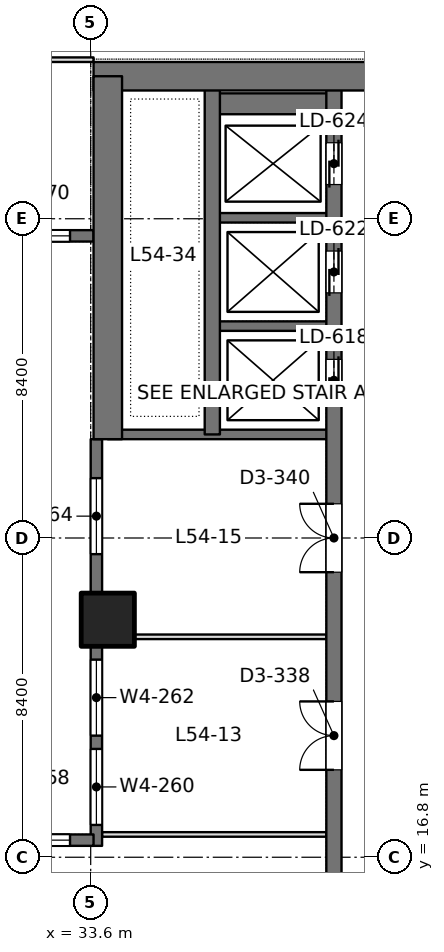
"""IFC4 building model, lengths in metres.
Left out: names, types, materials, properties, quantities, classifications, styles, units other than length and angle.
Written with IfcOpenShell. Run it as: python <this file> out.ifc"""

import sys

from ifc_helpers import new_model, si_unit, direction, frame, frame_2d, origin, origin_2d, place, context, subcontext, project, spatial, rectangle, extrude, element, fill, save


model = new_model("IFC4")
c1 = context("Model", 3, precision=1e-05, world=origin(), true_north=direction((0.0, 1.0)))
c2 = subcontext(c1, "Body", "Model", "MODEL_VIEW")
j1 = project(units=[si_unit("LENGTHUNIT", "METRE"), si_unit("PLANEANGLEUNIT", "RADIAN")], contexts=[c1])
p1 = place(None, origin())
s1 = spatial("IfcSite", under=j1, at=p1, CompositionType="ELEMENT")
p2 = place(p1, origin())
s2 = spatial("IfcBuilding", under=s1, at=p2, CompositionType="ELEMENT")
p3 = place(p2, frame((0.0, 0.0, 236.4)))
s3 = spatial("IfcBuildingStorey", under=s2, at=p3, CompositionType="ELEMENT", Elevation=236.4)
p4 = place(p3, frame((34.05, 23.05, 0.0), z_axis=(0.0, 0.0, 1.0), x_axis=(1.0, 0.0, 0.0)))
e1 = element("IfcColumn", 1, at=p4, inside=s3, PredefinedType="COLUMN", context=c2, shape_type="SweptSolid", body=[
    extrude(rectangle(XDim=1.4, YDim=1.4, at=origin_2d()), origin(), (0.0, 0.0, 1.0), 4.2),
])
p5 = place(p3, frame((33.675, 37.35, 0.0), z_axis=(0.0, 0.0, 1.0), x_axis=(1.0, 0.0, 0.0)))
e2 = element("IfcWall", 2, at=p5, inside=s3, PredefinedType="SHEAR", context=c2, shape_type="SweptSolid", body=[
    extrude(rectangle(XDim=17.85, YDim=0.75, at=frame_2d((8.925, 0.0))), origin(), (0.0, 0.0, 1.0), 4.2),
])
p6 = place(p5, frame((7.175, 0.0, 0.0)))
e3 = element("IfcOpeningElement", 3, at=p6, cuts=e2, PredefinedType="OPENING", context=c2, shape_type="SweptSolid", body=[
    extrude(rectangle(XDim=1.8, YDim=2.4, at=frame_2d((0.9, 1.2))), frame((0.0, 0.385, 0.0), z_axis=(0.0, -1.0, 0.0), x_axis=(1.0, 0.0, 0.0)), (0.0, 0.0, 1.0), 0.77),
])
p7 = place(p3, frame((34.05, 27.8, 0.0), z_axis=(0.0, 0.0, 1.0), x_axis=(0.0, 1.0, 0.0)))
e4 = element("IfcWall", 4, at=p7, inside=s3, PredefinedType="SHEAR", context=c2, shape_type="SweptSolid", body=[
    extrude(rectangle(XDim=9.55, YDim=0.75, at=frame_2d((4.775, 0.0))), origin(), (0.0, 0.0, 1.0), 4.2),
])
p8 = place(p3, frame((40.0, 13.05, 0.0), z_axis=(0.0, 0.0, 1.0), x_axis=(0.0, 1.0, 0.0)))
e5 = element("IfcWall", 5, at=p8, inside=s3, PredefinedType="SHEAR", context=c2, shape_type="SweptSolid", body=[
    extrude(rectangle(XDim=24.3, YDim=0.4, at=frame_2d((12.15, 0.0))), origin(), (0.0, 0.0, 1.0), 4.2),
])
p9 = place(p8, frame((15.75, 0.0, 0.0)))
e6 = element("IfcOpeningElement", 6, at=p9, cuts=e5, PredefinedType="OPENING", context=c2, shape_type="SweptSolid", body=[
    extrude(rectangle(XDim=1.1, YDim=2.2, at=frame_2d((0.55, 1.1))), frame((0.0, 0.21, 0.0), z_axis=(0.0, -1.0, 0.0), x_axis=(1.0, 0.0, 0.0)), (0.0, 0.0, 1.0), 0.42),
])
p10 = place(p8, frame((18.6, 0.0, 0.0)))
e7 = element("IfcOpeningElement", 7, at=p10, cuts=e5, PredefinedType="OPENING", context=c2, shape_type="SweptSolid", body=[
    extrude(rectangle(XDim=1.1, YDim=2.2, at=frame_2d((0.55, 1.1))), frame((0.0, 0.21, 0.0), z_axis=(0.0, -1.0, 0.0), x_axis=(1.0, 0.0, 0.0)), (0.0, 0.0, 1.0), 0.42),
])
p11 = place(p8, frame((21.45, 0.0, 0.0)))
e8 = element("IfcOpeningElement", 8, at=p11, cuts=e5, PredefinedType="OPENING", context=c2, shape_type="SweptSolid", body=[
    extrude(rectangle(XDim=1.1, YDim=2.2, at=frame_2d((0.55, 1.1))), frame((0.0, 0.21, 0.0), z_axis=(0.0, -1.0, 0.0), x_axis=(1.0, 0.0, 0.0)), (0.0, 0.0, 1.0), 0.42),
])
p12 = place(p8, frame((6.05, 0.0, 0.0)))
e9 = element("IfcOpeningElement", 9, at=p12, cuts=e5, PredefinedType="OPENING", context=c2, shape_type="SweptSolid", body=[
    extrude(rectangle(XDim=1.8, YDim=2.4, at=frame_2d((0.9, 1.2))), frame((0.0, 0.21, 0.0), z_axis=(0.0, -1.0, 0.0), x_axis=(1.0, 0.0, 0.0)), (0.0, 0.0, 1.0), 0.42),
])
p13 = place(p8, frame((11.25, 0.0, 0.0)))
e10 = element("IfcOpeningElement", 10, at=p13, cuts=e5, PredefinedType="OPENING", context=c2, shape_type="SweptSolid", body=[
    extrude(rectangle(XDim=1.8, YDim=2.4, at=frame_2d((0.9, 1.2))), frame((0.0, 0.21, 0.0), z_axis=(0.0, -1.0, 0.0), x_axis=(1.0, 0.0, 0.0)), (0.0, 0.0, 1.0), 0.42),
])
p14 = place(p3, frame((36.8, 27.925, 0.0), z_axis=(0.0, 0.0, 1.0), x_axis=(0.0, 1.0, 0.0)))
e11 = element("IfcWall", 11, at=p14, inside=s3, PredefinedType="SHEAR", context=c2, shape_type="SweptSolid", body=[
    extrude(rectangle(XDim=9.425, YDim=0.4, at=frame_2d((4.712, 0.0))), origin(), (0.0, 0.0, 1.0), 4.2),
])
p15 = place(p3, frame((40.0, 27.925, 0.0), z_axis=(0.0, 0.0, 1.0), x_axis=(-1.0, 0.0, 0.0)))
e12 = element("IfcWall", 12, at=p15, inside=s3, PredefinedType="SHEAR", context=c2, shape_type="SweptSolid", body=[
    extrude(rectangle(XDim=5.95, YDim=0.25, at=frame_2d((2.975, 0.0))), origin(), (0.0, 0.0, 1.0), 4.2),
])
for number, where, z_axis, x_axis in (
    (13, (40.0, 30.775, 0.0), (0.0, 0.0, 1.0), (-1.0, 0.0, 0.0)),
    (14, (40.0, 33.625, 0.0), (0.0, 0.0, 1.0), (-1.0, 0.0, 0.0)),
):
    element("IfcWall", number, at=place(p3, frame(where, z_axis=z_axis, x_axis=x_axis)), inside=s3, PredefinedType="SHEAR", context=c2, shape_type="SweptSolid", body=[
        extrude(rectangle(XDim=3.2, YDim=0.25, at=frame_2d((1.6, 0.0))), origin(), (0.0, 0.0, 1.0), 4.2),
    ])
p16 = place(p3, frame((40.0, 36.625, 0.0), z_axis=(0.0, 0.0, 1.0), x_axis=(-1.0, 0.0, 0.0)))
e15 = element("IfcWall", 15, at=p16, inside=s3, PredefinedType="SHEAR", context=c2, shape_type="SweptSolid", body=[
    extrude(rectangle(XDim=3.2, YDim=0.55, at=frame_2d((1.6, 0.0))), origin(), (0.0, 0.0, 1.0), 4.2),
])
p17 = place(p3, frame((33.75, 17.1, 0.0), z_axis=(0.0, 0.0, 1.0), x_axis=(0.0, 1.0, 0.0)))
e16 = element("IfcWall", 16, at=p17, inside=s3, PredefinedType="SOLIDWALL", context=c2, shape_type="SweptSolid", body=[
    extrude(rectangle(XDim=10.7, YDim=0.3, at=frame_2d((5.35, 0.0))), origin(), (0.0, 0.0, 1.0), 4.05),
])
p18 = place(p17, frame((0.55, 0.0, 0.9)))
e17 = element("IfcOpeningElement", 17, at=p18, cuts=e16, PredefinedType="OPENING", context=c2, shape_type="SweptSolid", body=[
    extrude(rectangle(XDim=2.0, YDim=1.9, at=frame_2d((1.0, 0.95))), frame((0.0, 0.16, 0.0), z_axis=(0.0, -1.0, 0.0), x_axis=(1.0, 0.0, 0.0)), (0.0, 0.0, 1.0), 0.32),
])
p19 = place(p17, frame((2.9, 0.0, 0.9)))
e18 = element("IfcOpeningElement", 18, at=p19, cuts=e16, PredefinedType="OPENING", context=c2, shape_type="SweptSolid", body=[
    extrude(rectangle(XDim=2.0, YDim=1.9, at=frame_2d((1.0, 0.95))), frame((0.0, 0.16, 0.0), z_axis=(0.0, -1.0, 0.0), x_axis=(1.0, 0.0, 0.0)), (0.0, 0.0, 1.0), 0.32),
])
p20 = place(p17, frame((7.675, 0.0, 0.9)))
e19 = element("IfcOpeningElement", 19, at=p20, cuts=e16, PredefinedType="OPENING", context=c2, shape_type="SweptSolid", body=[
    extrude(rectangle(XDim=2.0, YDim=1.9, at=frame_2d((1.0, 0.95))), frame((0.0, 0.16, 0.0), z_axis=(0.0, -1.0, 0.0), x_axis=(1.0, 0.0, 0.0)), (0.0, 0.0, 1.0), 0.32),
])
p21 = place(p3, frame((25.75, 17.25, 0.0), z_axis=(0.0, 0.0, 1.0), x_axis=(1.0, 0.0, 0.0)))
e20 = element("IfcWall", 20, at=p21, inside=s3, PredefinedType="SOLIDWALL", context=c2, shape_type="SweptSolid", body=[
    extrude(rectangle(XDim=7.925, YDim=0.3, at=frame_2d((3.962, 0.0))), origin(), (0.0, 0.0, 1.0), 4.05),
])
p22 = place(p21, frame((0.069, 0.0, 0.9)))
e21 = element("IfcOpeningElement", 21, at=p22, cuts=e20, PredefinedType="OPENING", context=c2, shape_type="SweptSolid", body=[
    extrude(rectangle(XDim=2.0, YDim=1.9, at=frame_2d((1.0, 0.95))), frame((0.0, 0.16, 0.0), z_axis=(0.0, -1.0, 0.0), x_axis=(1.0, 0.0, 0.0)), (0.0, 0.0, 1.0), 0.32),
])
p23 = place(p21, frame((2.688, 0.0, 0.9)))
e22 = element("IfcOpeningElement", 22, at=p23, cuts=e20, PredefinedType="OPENING", context=c2, shape_type="SweptSolid", body=[
    extrude(rectangle(XDim=2.0, YDim=1.9, at=frame_2d((1.0, 0.95))), frame((0.0, 0.16, 0.0), z_axis=(0.0, -1.0, 0.0), x_axis=(1.0, 0.0, 0.0)), (0.0, 0.0, 1.0), 0.32),
])
p24 = place(p21, frame((5.306, 0.0, 0.9)))
e23 = element("IfcOpeningElement", 23, at=p24, cuts=e20, PredefinedType="OPENING", context=c2, shape_type="SweptSolid", body=[
    extrude(rectangle(XDim=2.0, YDim=1.9, at=frame_2d((1.0, 0.95))), frame((0.0, 0.16, 0.0), z_axis=(0.0, -1.0, 0.0), x_axis=(1.0, 0.0, 0.0)), (0.0, 0.0, 1.0), 0.32),
])
p25 = place(p3, frame((25.75, 33.15, 0.0), z_axis=(0.0, 0.0, 1.0), x_axis=(1.0, 0.0, 0.0)))
e24 = element("IfcWall", 24, at=p25, inside=s3, PredefinedType="SOLIDWALL", context=c2, shape_type="SweptSolid", body=[
    extrude(rectangle(XDim=7.925, YDim=0.3, at=frame_2d((3.962, 0.0))), origin(), (0.0, 0.0, 1.0), 4.05),
])
p26 = place(p25, frame((0.069, 0.0, 0.9)))
e25 = element("IfcOpeningElement", 25, at=p26, cuts=e24, PredefinedType="OPENING", context=c2, shape_type="SweptSolid", body=[
    extrude(rectangle(XDim=2.0, YDim=1.9, at=frame_2d((1.0, 0.95))), frame((0.0, 0.16, 0.0), z_axis=(0.0, -1.0, 0.0), x_axis=(1.0, 0.0, 0.0)), (0.0, 0.0, 1.0), 0.32),
])
p27 = place(p25, frame((2.688, 0.0, 0.9)))
e26 = element("IfcOpeningElement", 26, at=p27, cuts=e24, PredefinedType="OPENING", context=c2, shape_type="SweptSolid", body=[
    extrude(rectangle(XDim=2.0, YDim=1.9, at=frame_2d((1.0, 0.95))), frame((0.0, 0.16, 0.0), z_axis=(0.0, -1.0, 0.0), x_axis=(1.0, 0.0, 0.0)), (0.0, 0.0, 1.0), 0.32),
])
p28 = place(p25, frame((5.306, 0.0, 0.9)))
e27 = element("IfcOpeningElement", 27, at=p28, cuts=e24, PredefinedType="OPENING", context=c2, shape_type="SweptSolid", body=[
    extrude(rectangle(XDim=2.0, YDim=1.9, at=frame_2d((1.0, 0.95))), frame((0.0, 0.16, 0.0), z_axis=(0.0, -1.0, 0.0), x_axis=(1.0, 0.0, 0.0)), (0.0, 0.0, 1.0), 0.32),
])
p29 = place(p3, frame((33.898, 17.4, 0.0), z_axis=(0.0, 0.0, 1.0), x_axis=(1.0, 0.0, 0.0)))
e28 = element("IfcWall", 28, at=p29, inside=s3, PredefinedType="PARTITIONING", context=c2, shape_type="SweptSolid", body=[
    extrude(rectangle(XDim=5.904, YDim=0.12, at=frame_2d((2.952, 0.0))), origin(), (0.0, 0.0, 1.0), 3.55),
])
p30 = place(p3, frame((34.749, 22.6, 0.0), z_axis=(0.0, 0.0, 1.0), x_axis=(1.0, 0.0, 0.0)))
e29 = element("IfcWall", 29, at=p30, inside=s3, PredefinedType="PARTITIONING", context=c2, shape_type="SweptSolid", body=[
    extrude(rectangle(XDim=5.053, YDim=0.12, at=frame_2d((2.526, 0.0))), origin(), (0.0, 0.0, 1.0), 4.05),
])
p31 = place(p3, frame((16.725, 37.785, 0.0), z_axis=(0.0, 0.0, 1.0), x_axis=(1.0, 0.0, 0.0)))
e30 = element("IfcWall", 30, at=p31, inside=s3, PredefinedType="PARTITIONING", context=c2, shape_type="SweptSolid", body=[
    extrude(rectangle(XDim=16.95, YDim=0.12, at=frame_2d((8.475, 0.0))), origin(), (0.0, 0.0, 1.0), 3.55),
])
p32 = place(p31, frame((7.575, 0.0, 0.0)))
e31 = element("IfcOpeningElement", 31, at=p32, cuts=e30, PredefinedType="OPENING", context=c2, shape_type="SweptSolid", body=[
    extrude(rectangle(XDim=1.8, YDim=2.2, at=frame_2d((0.9, 1.1))), frame((0.0, 0.07, 0.0), z_axis=(0.0, -1.0, 0.0), x_axis=(1.0, 0.0, 0.0)), (0.0, 0.0, 1.0), 0.14),
])
p33 = place(p18, origin())
e32 = element("IfcWindow", 32, at=p33, inside=s3, PartitioningType="SINGLE_PANEL", PredefinedType="WINDOW", context=c2, shape_type="SweptSolid", body=[
    extrude(rectangle(XDim=2.0, YDim=1.9, at=frame_2d((1.0, 0.95))), frame((0.0, 0.03, 0.0), z_axis=(0.0, -1.0, 0.0), x_axis=(1.0, 0.0, 0.0)), (0.0, 0.0, 1.0), 0.06),
])
fill(e17, e32)
p34 = place(p19, origin())
e33 = element("IfcWindow", 33, at=p34, inside=s3, PartitioningType="SINGLE_PANEL", PredefinedType="WINDOW", context=c2, shape_type="SweptSolid", body=[
    extrude(rectangle(XDim=2.0, YDim=1.9, at=frame_2d((1.0, 0.95))), frame((0.0, 0.03, 0.0), z_axis=(0.0, -1.0, 0.0), x_axis=(1.0, 0.0, 0.0)), (0.0, 0.0, 1.0), 0.06),
])
fill(e18, e33)
p35 = place(p20, origin())
e34 = element("IfcWindow", 34, at=p35, inside=s3, PartitioningType="SINGLE_PANEL", PredefinedType="WINDOW", context=c2, shape_type="SweptSolid", body=[
    extrude(rectangle(XDim=2.0, YDim=1.9, at=frame_2d((1.0, 0.95))), frame((0.0, 0.03, 0.0), z_axis=(0.0, -1.0, 0.0), x_axis=(1.0, 0.0, 0.0)), (0.0, 0.0, 1.0), 0.06),
])
fill(e19, e34)
p36 = place(p24, origin())
e35 = element("IfcWindow", 35, at=p36, inside=s3, PartitioningType="SINGLE_PANEL", PredefinedType="WINDOW", context=c2, shape_type="SweptSolid", body=[
    extrude(rectangle(XDim=2.0, YDim=1.9, at=frame_2d((1.0, 0.95))), frame((0.0, 0.03, 0.0), z_axis=(0.0, -1.0, 0.0), x_axis=(1.0, 0.0, 0.0)), (0.0, 0.0, 1.0), 0.06),
])
fill(e23, e35)
p37 = place(p28, origin())
e36 = element("IfcWindow", 36, at=p37, inside=s3, PartitioningType="SINGLE_PANEL", PredefinedType="WINDOW", context=c2, shape_type="SweptSolid", body=[
    extrude(rectangle(XDim=2.0, YDim=1.9, at=frame_2d((1.0, 0.95))), frame((0.0, 0.03, 0.0), z_axis=(0.0, -1.0, 0.0), x_axis=(1.0, 0.0, 0.0)), (0.0, 0.0, 1.0), 0.06),
])
fill(e27, e36)
p38 = place(p9, origin())
e37 = element("IfcDoor", 37, at=p38, inside=s3, OperationType="DOUBLE_DOOR_SLIDING", PredefinedType="DOOR", context=c2, shape_type="SweptSolid", body=[
    extrude(rectangle(XDim=1.1, YDim=2.2, at=frame_2d((0.55, 1.1))), frame((0.0, 0.025, 0.0), z_axis=(0.0, -1.0, 0.0), x_axis=(1.0, 0.0, 0.0)), (0.0, 0.0, 1.0), 0.05),
])
fill(e6, e37)
p39 = place(p10, origin())
e38 = element("IfcDoor", 38, at=p39, inside=s3, OperationType="DOUBLE_DOOR_SLIDING", PredefinedType="DOOR", context=c2, shape_type="SweptSolid", body=[
    extrude(rectangle(XDim=1.1, YDim=2.2, at=frame_2d((0.55, 1.1))), frame((0.0, 0.025, 0.0), z_axis=(0.0, -1.0, 0.0), x_axis=(1.0, 0.0, 0.0)), (0.0, 0.0, 1.0), 0.05),
])
fill(e7, e38)
p40 = place(p11, origin())
e39 = element("IfcDoor", 39, at=p40, inside=s3, OperationType="DOUBLE_DOOR_SLIDING", PredefinedType="DOOR", context=c2, shape_type="SweptSolid", body=[
    extrude(rectangle(XDim=1.1, YDim=2.2, at=frame_2d((0.55, 1.1))), frame((0.0, 0.025, 0.0), z_axis=(0.0, -1.0, 0.0), x_axis=(1.0, 0.0, 0.0)), (0.0, 0.0, 1.0), 0.05),
])
fill(e8, e39)
p41 = place(p12, origin())
e40 = element("IfcDoor", 40, at=p41, inside=s3, OperationType="DOUBLE_DOOR_SINGLE_SWING", PredefinedType="DOOR", context=c2, shape_type="SweptSolid", body=[
    extrude(rectangle(XDim=1.8, YDim=2.4, at=frame_2d((0.9, 1.2))), frame((0.0, 0.025, 0.0), z_axis=(0.0, -1.0, 0.0), x_axis=(1.0, 0.0, 0.0)), (0.0, 0.0, 1.0), 0.05),
])
fill(e9, e40)
p42 = place(p13, origin())
e41 = element("IfcDoor", 41, at=p42, inside=s3, OperationType="DOUBLE_DOOR_SINGLE_SWING", PredefinedType="DOOR", context=c2, shape_type="SweptSolid", body=[
    extrude(rectangle(XDim=1.8, YDim=2.4, at=frame_2d((0.9, 1.2))), frame((0.0, 0.025, 0.0), z_axis=(0.0, -1.0, 0.0), x_axis=(1.0, 0.0, 0.0)), (0.0, 0.0, 1.0), 0.05),
])
fill(e10, e41)
save(model, sys.argv[1])
